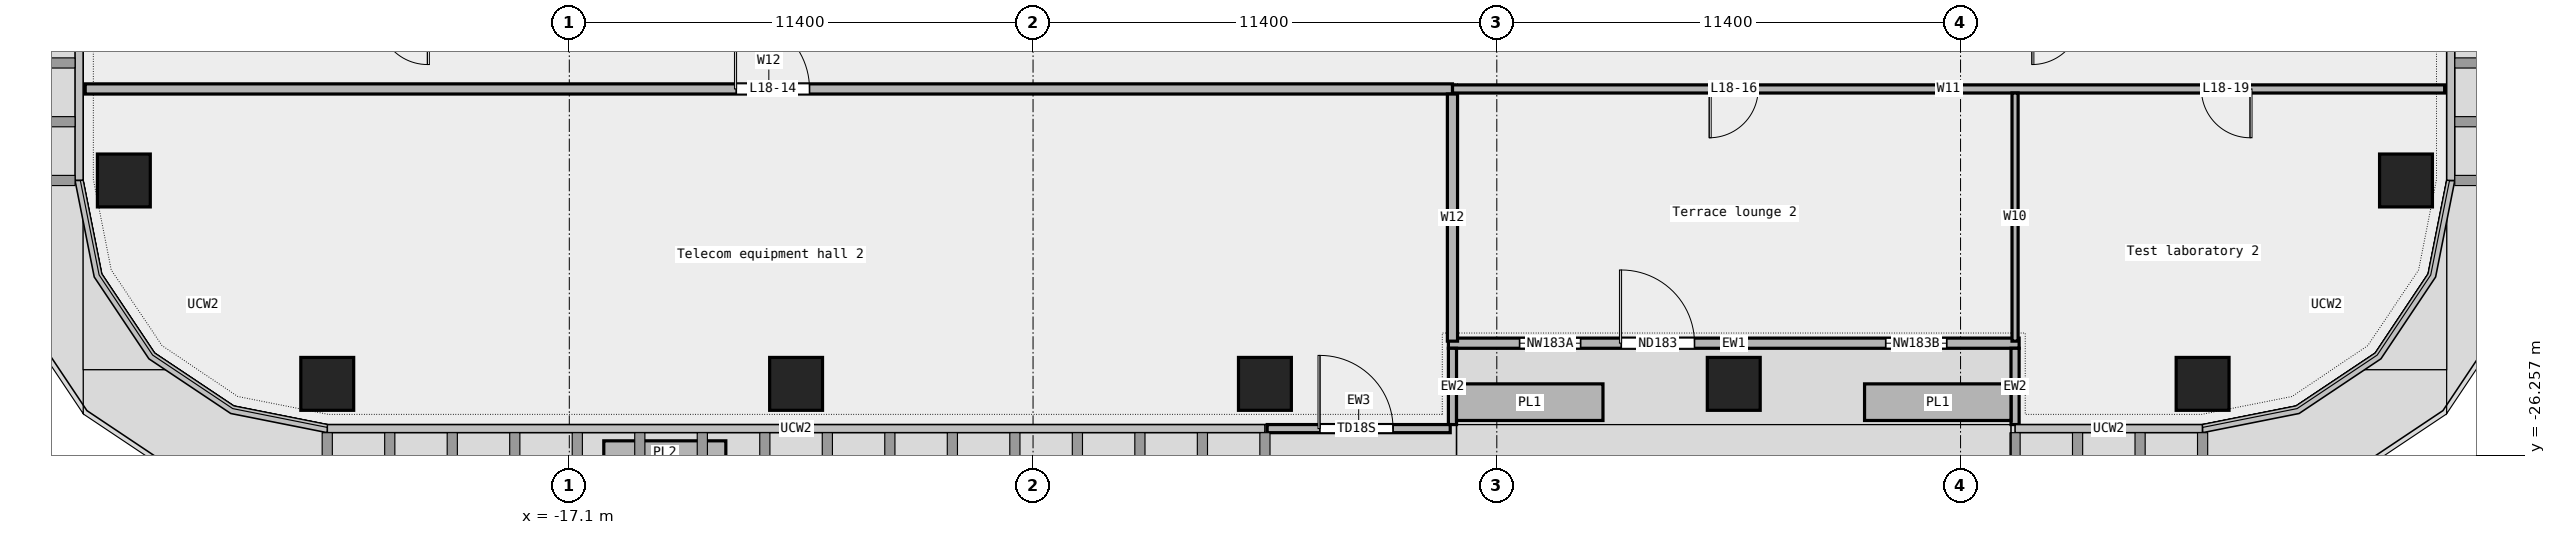
"""IFC4 building model, lengths in metres.
Left out: names, types, materials, properties, quantities, classifications, styles, units other than length and angle.
Written with IfcOpenShell. Run it as: python <this file> out.ifc"""

import sys

from ifc_helpers import new_model, si_unit, direction, frame, frame_2d, origin, origin_2d, place, context, subcontext, project, spatial, rectangle, extrude, element, fill, save


model = new_model("IFC4")
c1 = context("Model", 3, precision=1e-05, world=origin(), true_north=direction((0.0, 1.0)))
c2 = subcontext(c1, "Body", "Model", "MODEL_VIEW")
j1 = project(units=[si_unit("LENGTHUNIT", "METRE"), si_unit("PLANEANGLEUNIT", "RADIAN")], contexts=[c1])
p1 = place(None, origin())
s1 = spatial("IfcSite", under=j1, at=p1, CompositionType="ELEMENT")
p2 = place(p1, origin())
s2 = spatial("IfcBuilding", under=s1, at=p2, CompositionType="ELEMENT")
p3 = place(p2, frame((0.0, 0.0, 94.6)))
s3 = spatial("IfcBuildingStorey", under=s2, at=p3, CompositionType="ELEMENT", Elevation=94.6)
for number, where, z_axis, x_axis in (
    (1, (-23.05, -24.5, 0.0), (0.0, 0.0, 1.0), (1.0, 0.0, 0.0)),
    (2, (-11.525, -24.5, 0.0), (0.0, 0.0, 1.0), (1.0, 0.0, 0.0)),
    (3, (0.0, -24.5, 0.0), (0.0, 0.0, 1.0), (1.0, 0.0, 0.0)),
    (4, (11.525, -24.5, 0.0), (0.0, 0.0, 1.0), (1.0, 0.0, 0.0)),
    (5, (23.05, -24.5, 0.0), (0.0, 0.0, 1.0), (1.0, 0.0, 0.0)),
    (6, (28.05, -19.5, 0.0), (0.0, 0.0, 1.0), (1.0, 0.0, 0.0)),
    (7, (-28.05, -19.5, 0.0), (0.0, 0.0, 1.0), (1.0, 0.0, 0.0)),
):
    element("IfcColumn", number, at=place(p3, frame(where, z_axis=z_axis, x_axis=x_axis)), inside=s3, PredefinedType="COLUMN", context=c2, shape_type="SweptSolid", body=[
        extrude(rectangle(XDim=1.3, YDim=1.3, at=origin_2d()), origin(), (0.0, 0.0, 1.0), 4.05),
    ])
p4 = place(p3, frame((4.51, -23.5, 0.0), z_axis=(0.0, 0.0, 1.0), x_axis=(1.0, 0.0, 0.0)))
e8 = element("IfcWall", 8, at=p4, inside=s3, PredefinedType="STANDARD", context=c2, shape_type="SweptSolid", body=[
    extrude(rectangle(XDim=14.03, YDim=0.25, at=frame_2d((7.015, 0.0))), origin(), (0.0, 0.0, 1.0), 4.05),
])
p5 = place(p4, frame((1.75, 0.0, 0.45)))
e9 = element("IfcOpeningElement", 9, at=p5, cuts=e8, PredefinedType="OPENING", context=c2, shape_type="SweptSolid", body=[
    extrude(rectangle(XDim=1.5, YDim=3.0, at=frame_2d((0.75, 1.5))), frame((0.0, 0.137, 0.0), z_axis=(0.0, -1.0, 0.0), x_axis=(1.0, 0.0, 0.0)), (0.0, 0.0, 1.0), 0.274),
])
p6 = place(p4, frame((4.25, 0.0, 0.0)))
e10 = element("IfcOpeningElement", 10, at=p6, cuts=e8, PredefinedType="OPENING", context=c2, shape_type="SweptSolid", body=[
    extrude(rectangle(XDim=1.8, YDim=2.4, at=frame_2d((0.9, 1.2))), frame((0.0, 0.137, 0.0), z_axis=(0.0, -1.0, 0.0), x_axis=(1.0, 0.0, 0.0)), (0.0, 0.0, 1.0), 0.274),
])
p7 = place(p4, frame((10.75, 0.0, 0.45)))
e11 = element("IfcOpeningElement", 11, at=p7, cuts=e8, PredefinedType="OPENING", context=c2, shape_type="SweptSolid", body=[
    extrude(rectangle(XDim=1.5, YDim=3.0, at=frame_2d((0.75, 1.5))), frame((0.0, 0.137, 0.0), z_axis=(0.0, -1.0, 0.0), x_axis=(1.0, 0.0, 0.0)), (0.0, 0.0, 1.0), 0.274),
])
for number, where, z_axis, x_axis in (
    (12, (4.61, -25.5, 0.0), (0.0, 0.0, 1.0), (0.0, 1.0, 0.0)),
    (13, (18.44, -25.5, 0.0), (0.0, 0.0, 1.0), (0.0, 1.0, 0.0)),
):
    element("IfcWall", number, at=place(p3, frame(where, z_axis=z_axis, x_axis=x_axis)), inside=s3, PredefinedType="STANDARD", context=c2, shape_type="SweptSolid", body=[
        extrude(rectangle(XDim=1.875, YDim=0.2, at=frame_2d((0.938, 0.0))), origin(), (0.0, 0.0, 1.0), 4.05),
    ])
for number, where, z_axis, x_axis in (
    (14, (4.71, -24.95, 0.0), (0.0, 0.0, 1.0), (1.0, 0.0, 0.0)),
    (15, (14.74, -24.95, 0.0), (0.0, 0.0, 1.0), (1.0, 0.0, 0.0)),
):
    element("IfcWall", number, at=place(p3, frame(where, z_axis=z_axis, x_axis=x_axis)), inside=s3, PredefinedType="STANDARD", context=c2, shape_type="SweptSolid", body=[
        extrude(rectangle(XDim=3.6, YDim=0.9, at=frame_2d((1.8, 0.0))), origin(), (0.0, 0.0, 1.0), 0.7),
    ])
p8 = place(p3, frame((0.055, -25.6, 0.0), z_axis=(0.0, 0.0, 1.0), x_axis=(1.0, 0.0, 0.0)))
e16 = element("IfcWall", 16, at=p8, inside=s3, PredefinedType="STANDARD", context=c2, shape_type="SweptSolid", body=[
    extrude(rectangle(XDim=4.5, YDim=0.2, at=frame_2d((2.25, 0.0))), origin(), (0.0, 0.0, 1.0), 4.05),
])
p9 = place(p8, frame((1.295, 0.0, 0.0)))
e17 = element("IfcOpeningElement", 17, at=p9, cuts=e16, PredefinedType="OPENING", context=c2, shape_type="SweptSolid", body=[
    extrude(rectangle(XDim=1.8, YDim=2.4, at=frame_2d((0.9, 1.2))), frame((0.0, 0.112, 0.0), z_axis=(0.0, -1.0, 0.0), x_axis=(1.0, 0.0, 0.0)), (0.0, 0.0, 1.0), 0.224),
])
p10 = place(p3, frame((-16.252, -26.2, 0.0), z_axis=(0.0, 0.0, 1.0), x_axis=(1.0, 0.0, 0.0)))
e18 = element("IfcWall", 18, at=p10, inside=s3, PredefinedType="STANDARD", context=c2, shape_type="SweptSolid", body=[
    extrude(rectangle(XDim=3.0, YDim=0.6, at=frame_2d((1.5, 0.0))), origin(), (0.0, 0.0, 1.0), 0.7),
])
p11 = place(p3, frame((4.61, -17.25, 0.0), z_axis=(0.0, 0.0, 1.0), x_axis=(1.0, 0.0, 0.0)))
e19 = element("IfcWall", 19, at=p11, inside=s3, PredefinedType="PARTITIONING", context=c2, shape_type="SweptSolid", body=[
    extrude(rectangle(XDim=24.39, YDim=0.2, at=frame_2d((12.195, 0.0))), origin(), (0.0, 0.0, 1.0), 4.05),
])
p12 = place(p11, frame((6.315, 0.0, 0.0)))
e20 = element("IfcOpeningElement", 20, at=p12, cuts=e19, PredefinedType="OPENING", context=c2, shape_type="SweptSolid", body=[
    extrude(rectangle(XDim=1.2, YDim=2.1, at=frame_2d((0.6, 1.05))), frame((0.0, 0.112, 0.0), z_axis=(0.0, -1.0, 0.0), x_axis=(1.0, 0.0, 0.0)), (0.0, 0.0, 1.0), 0.224),
])
p13 = place(p11, frame((18.41, 0.0, 0.0)))
e21 = element("IfcOpeningElement", 21, at=p13, cuts=e19, PredefinedType="OPENING", context=c2, shape_type="SweptSolid", body=[
    extrude(rectangle(XDim=1.2, YDim=2.1, at=frame_2d((0.6, 1.05))), frame((0.0, 0.112, 0.0), z_axis=(0.0, -1.0, 0.0), x_axis=(1.0, 0.0, 0.0)), (0.0, 0.0, 1.0), 0.224),
])
p14 = place(p3, frame((-29.0, -17.25, 0.0), z_axis=(0.0, 0.0, 1.0), x_axis=(1.0, 0.0, 0.0)))
e22 = element("IfcWall", 22, at=p14, inside=s3, PredefinedType="PARTITIONING", context=c2, shape_type="SweptSolid", body=[
    extrude(rectangle(XDim=33.61, YDim=0.25, at=frame_2d((16.805, 0.0))), origin(), (0.0, 0.0, 1.0), 4.05),
])
p15 = place(p14, frame((16.005, 0.0, 0.0)))
e23 = element("IfcOpeningElement", 23, at=p15, cuts=e22, PredefinedType="OPENING", context=c2, shape_type="SweptSolid", body=[
    extrude(rectangle(XDim=1.8, YDim=2.1, at=frame_2d((0.9, 1.05))), frame((0.0, 0.137, 0.0), z_axis=(0.0, -1.0, 0.0), x_axis=(1.0, 0.0, 0.0)), (0.0, 0.0, 1.0), 0.274),
])
p16 = place(p3, frame((4.61, -23.45, 0.0), z_axis=(0.0, 0.0, 1.0), x_axis=(0.0, 1.0, 0.0)))
e24 = element("IfcWall", 24, at=p16, inside=s3, PredefinedType="PARTITIONING", context=c2, shape_type="SweptSolid", body=[
    extrude(rectangle(XDim=6.075, YDim=0.25, at=frame_2d((3.038, 0.0))), origin(), (0.0, 0.0, 1.0), 4.05),
])
p17 = place(p3, frame((18.44, -23.45, 0.0), z_axis=(0.0, 0.0, 1.0), x_axis=(0.0, 1.0, 0.0)))
e25 = element("IfcWall", 25, at=p17, inside=s3, PredefinedType="PARTITIONING", context=c2, shape_type="SweptSolid", body=[
    extrude(rectangle(XDim=6.1, YDim=0.15, at=frame_2d((3.05, 0.0))), origin(), (0.0, 0.0, 1.0), 4.05),
])
p18 = place(p5, origin())
e26 = element("IfcWindow", 26, at=p18, inside=s3, PartitioningType="SINGLE_PANEL", PredefinedType="WINDOW", context=c2, shape_type="SweptSolid", body=[
    extrude(rectangle(XDim=1.5, YDim=3.0, at=frame_2d((0.75, 1.5))), frame((0.0, 0.03, 0.0), z_axis=(0.0, -1.0, 0.0), x_axis=(1.0, 0.0, 0.0)), (0.0, 0.0, 1.0), 0.06),
])
fill(e9, e26)
p19 = place(p6, origin())
e27 = element("IfcDoor", 27, at=p19, inside=s3, OperationType="DOUBLE_DOOR_SINGLE_SWING", PredefinedType="DOOR", context=c2, shape_type="SweptSolid", body=[
    extrude(rectangle(XDim=1.8, YDim=2.4, at=frame_2d((0.9, 1.2))), frame((0.0, 0.025, 0.0), z_axis=(0.0, -1.0, 0.0), x_axis=(1.0, 0.0, 0.0)), (0.0, 0.0, 1.0), 0.05),
])
fill(e10, e27)
p20 = place(p7, origin())
e28 = element("IfcWindow", 28, at=p20, inside=s3, PartitioningType="SINGLE_PANEL", PredefinedType="WINDOW", context=c2, shape_type="SweptSolid", body=[
    extrude(rectangle(XDim=1.5, YDim=3.0, at=frame_2d((0.75, 1.5))), frame((0.0, 0.03, 0.0), z_axis=(0.0, -1.0, 0.0), x_axis=(1.0, 0.0, 0.0)), (0.0, 0.0, 1.0), 0.06),
])
fill(e11, e28)
p21 = place(p9, origin())
e29 = element("IfcDoor", 29, at=p21, inside=s3, OperationType="DOUBLE_DOOR_SINGLE_SWING", PredefinedType="DOOR", context=c2, shape_type="SweptSolid", body=[
    extrude(rectangle(XDim=1.8, YDim=2.4, at=frame_2d((0.9, 1.2))), frame((0.0, 0.025, 0.0), z_axis=(0.0, -1.0, 0.0), x_axis=(1.0, 0.0, 0.0)), (0.0, 0.0, 1.0), 0.05),
])
fill(e17, e29)
p22 = place(p15, origin())
e30 = element("IfcDoor", 30, at=p22, inside=s3, OperationType="DOUBLE_DOOR_SINGLE_SWING", PredefinedType="DOOR", context=c2, shape_type="SweptSolid", body=[
    extrude(rectangle(XDim=1.8, YDim=2.1, at=frame_2d((0.9, 1.05))), frame((0.0, 0.025, 0.0), z_axis=(0.0, -1.0, 0.0), x_axis=(1.0, 0.0, 0.0)), (0.0, 0.0, 1.0), 0.05),
])
fill(e23, e30)
p23 = place(p12, origin())
e31 = element("IfcDoor", 31, at=p23, inside=s3, OperationType="SINGLE_SWING_RIGHT", PredefinedType="DOOR", context=c2, shape_type="SweptSolid", body=[
    extrude(rectangle(XDim=1.2, YDim=2.1, at=frame_2d((0.6, 1.05))), frame((0.0, 0.025, 0.0), z_axis=(0.0, -1.0, 0.0), x_axis=(1.0, 0.0, 0.0)), (0.0, 0.0, 1.0), 0.05),
])
fill(e20, e31)
p24 = place(p13, origin())
e32 = element("IfcDoor", 32, at=p24, inside=s3, OperationType="SINGLE_SWING_LEFT", PredefinedType="DOOR", context=c2, shape_type="SweptSolid", body=[
    extrude(rectangle(XDim=1.2, YDim=2.1, at=frame_2d((0.6, 1.05))), frame((0.0, 0.025, 0.0), z_axis=(0.0, -1.0, 0.0), x_axis=(1.0, 0.0, 0.0)), (0.0, 0.0, 1.0), 0.05),
])
fill(e21, e32)
save(model, sys.argv[1])
